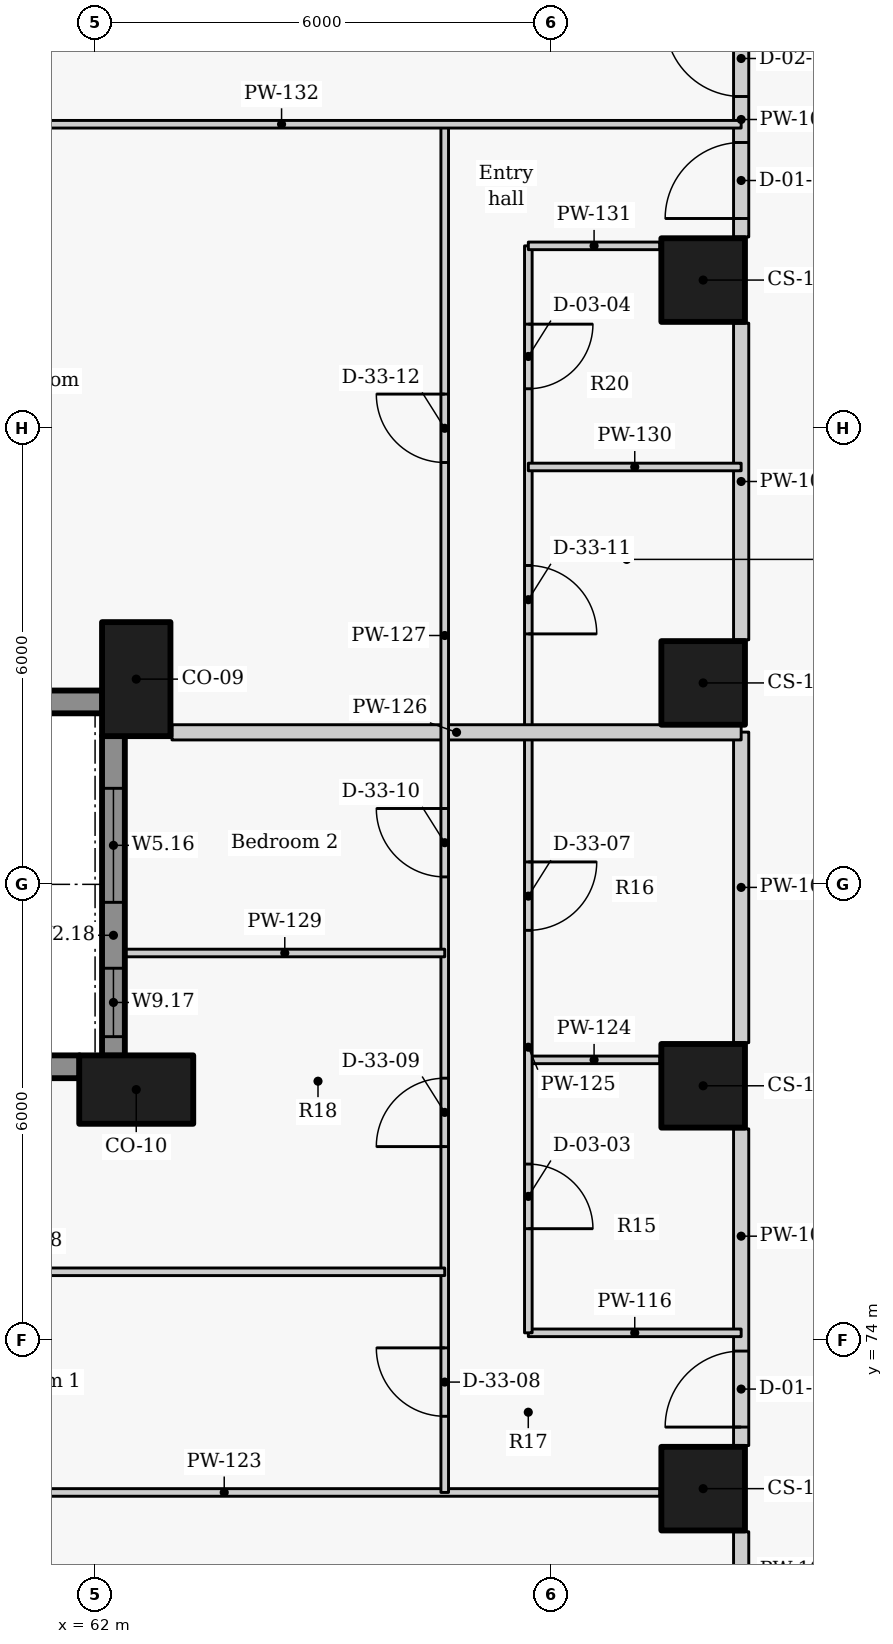
"""IFC4 building model, lengths in metres.
Left out: names, types, materials, properties, quantities, classifications, styles, units other than length and angle.
Written with IfcOpenShell. Run it as: python <this file> out.ifc"""

import sys

from ifc_helpers import new_model, si_unit, direction, frame, frame_2d, origin, origin_2d, place, context, subcontext, project, spatial, rectangle, extrude, element, fill, save


model = new_model("IFC4")
c1 = context("Model", 3, precision=1e-05, world=origin(), true_north=direction((0.0, 1.0)))
c2 = subcontext(c1, "Body", "Model", "MODEL_VIEW")
j1 = project(units=[si_unit("LENGTHUNIT", "METRE"), si_unit("PLANEANGLEUNIT", "RADIAN")], contexts=[c1])
p1 = place(None, origin())
s1 = spatial("IfcSite", under=j1, at=p1, CompositionType="ELEMENT")
p2 = place(p1, origin())
s2 = spatial("IfcBuilding", under=s1, at=p2, CompositionType="ELEMENT")
p3 = place(p2, frame((0.0, 0.0, 51.3)))
s3 = spatial("IfcBuildingStorey", under=s2, at=p3, CompositionType="ELEMENT", Elevation=51.3)
for number, where, z_axis, x_axis in (
    (1, (62.542, 82.7, 0.0), (0.0, 0.0, 1.0), (0.0, -1.0, 0.0)),
    (2, (62.542, 77.3, 0.0), (0.0, 0.0, 1.0), (-1.0, 0.0, 0.0)),
):
    element("IfcColumn", number, at=place(p3, frame(where, z_axis=z_axis, x_axis=x_axis)), inside=s3, PredefinedType="COLUMN", context=c2, shape_type="SweptSolid", body=[
        extrude(rectangle(XDim=1.5, YDim=0.9, at=origin_2d()), origin(), (0.0, 0.0, 1.0), 3.3),
    ])
for number, where, z_axis, x_axis in (
    (3, (70.0, 87.95, 0.0), (0.0, 0.0, 1.0), (0.0, -1.0, 0.0)),
    (4, (70.0, 82.65, 0.0), (0.0, 0.0, 1.0), (0.0, -1.0, 0.0)),
    (5, (70.0, 77.35, 0.0), (0.0, 0.0, 1.0), (0.0, -1.0, 0.0)),
    (6, (70.0, 72.05, 0.0), (0.0, 0.0, 1.0), (0.0, -1.0, 0.0)),
):
    element("IfcColumn", number, at=place(p3, frame(where, z_axis=z_axis, x_axis=x_axis)), inside=s3, PredefinedType="COLUMN", context=c2, shape_type="SweptSolid", body=[
        extrude(rectangle(XDim=1.1, YDim=1.1, at=origin_2d()), origin(), (0.0, 0.0, 1.0), 3.3),
    ])
p4 = place(p3, frame((57.923, 82.4, 0.0), z_axis=(0.0, 0.0, 1.0), x_axis=(1.0, 0.0, 0.0)))
e7 = element("IfcWall", 7, at=p4, inside=s3, PredefinedType="SOLIDWALL", context=c2, shape_type="SweptSolid", body=[
    extrude(rectangle(XDim=4.173, YDim=0.3, at=frame_2d((2.086, 0.0))), origin(), (0.0, 0.0, 1.0), 2.425),
])
p5 = place(p4, frame((1.036, 0.0, 0.9)))
e8 = element("IfcOpeningElement", 8, at=p5, cuts=e7, PredefinedType="OPENING", context=c2, shape_type="SweptSolid", body=[
    extrude(rectangle(XDim=2.1, YDim=1.1, at=frame_2d((1.05, 0.55))), frame((0.0, 0.16, 0.0), z_axis=(0.0, -1.0, 0.0), x_axis=(1.0, 0.0, 0.0)), (0.0, 0.0, 1.0), 0.32),
])
p6 = place(p3, frame((62.242, 81.954, 0.0), z_axis=(0.0, 0.0, 1.0), x_axis=(0.0, -1.0, 0.0)))
e9 = element("IfcWall", 9, at=p6, inside=s3, PredefinedType="SOLIDWALL", context=c2, shape_type="SweptSolid", body=[
    extrude(rectangle(XDim=4.208, YDim=0.3, at=frame_2d((2.104, 0.0))), origin(), (0.0, 0.0, 1.0), 2.425),
])
p7 = place(p6, frame((0.691, 0.0, 0.9)))
e10 = element("IfcOpeningElement", 10, at=p7, cuts=e9, PredefinedType="OPENING", context=c2, shape_type="SweptSolid", body=[
    extrude(rectangle(XDim=1.5, YDim=1.1, at=frame_2d((0.75, 0.55))), frame((0.0, 0.16, 0.0), z_axis=(0.0, -1.0, 0.0), x_axis=(1.0, 0.0, 0.0)), (0.0, 0.0, 1.0), 0.32),
])
p8 = place(p6, frame((3.058, 0.0, 0.9)))
e11 = element("IfcOpeningElement", 11, at=p8, cuts=e9, PredefinedType="OPENING", context=c2, shape_type="SweptSolid", body=[
    extrude(rectangle(XDim=0.9, YDim=1.1, at=frame_2d((0.45, 0.55))), frame((0.0, 0.16, 0.0), z_axis=(0.0, -1.0, 0.0), x_axis=(1.0, 0.0, 0.0)), (0.0, 0.0, 1.0), 0.32),
])
p9 = place(p3, frame((61.796, 77.6, 0.0), z_axis=(0.0, 0.0, 1.0), x_axis=(-1.0, 0.0, 0.0)))
e12 = element("IfcWall", 12, at=p9, inside=s3, PredefinedType="SOLIDWALL", context=c2, shape_type="SweptSolid", body=[
    extrude(rectangle(XDim=3.873, YDim=0.3, at=frame_2d((1.936, 0.0))), origin(), (0.0, 0.0, 1.0), 2.425),
])
p10 = place(p9, frame((0.886, 0.0, 0.9)))
e13 = element("IfcOpeningElement", 13, at=p10, cuts=e12, PredefinedType="OPENING", context=c2, shape_type="SweptSolid", body=[
    extrude(rectangle(XDim=2.1, YDim=1.1, at=frame_2d((1.05, 0.55))), frame((0.0, 0.16, 0.0), z_axis=(0.0, -1.0, 0.0), x_axis=(1.0, 0.0, 0.0)), (0.0, 0.0, 1.0), 0.32),
])
p11 = place(p3, frame((70.5, 68.267, 0.0), z_axis=(0.0, 0.0, 1.0), x_axis=(0.0, 1.0, 0.0)))
e14 = element("IfcWall", 14, at=p11, inside=s3, PredefinedType="PARTITIONING", context=c2, shape_type="SweptSolid", body=[
    extrude(rectangle(XDim=3.216, YDim=0.2, at=frame_2d((1.608, 0.0))), origin(), (0.0, 0.0, 1.0), 3.025),
])
p12 = place(p11, frame((1.108, 0.0, 0.0)))
e15 = element("IfcOpeningElement", 15, at=p12, cuts=e14, PredefinedType="OPENING", context=c2, shape_type="SweptSolid", body=[
    extrude(rectangle(XDim=1.0, YDim=2.1, at=frame_2d((0.5, 1.05))), frame((0.0, 0.11, 0.0), z_axis=(0.0, -1.0, 0.0), x_axis=(1.0, 0.0, 0.0)), (0.0, 0.0, 1.0), 0.22),
])
p13 = place(p3, frame((70.5, 72.617, 0.0), z_axis=(0.0, 0.0, 1.0), x_axis=(0.0, 1.0, 0.0)))
e16 = element("IfcWall", 16, at=p13, inside=s3, PredefinedType="PARTITIONING", context=c2, shape_type="SweptSolid", body=[
    extrude(rectangle(XDim=4.166, YDim=0.2, at=frame_2d((2.083, 0.0))), origin(), (0.0, 0.0, 1.0), 3.025),
])
p14 = place(p13, frame((0.243, 0.0, 0.0)))
e17 = element("IfcOpeningElement", 17, at=p14, cuts=e16, PredefinedType="OPENING", context=c2, shape_type="SweptSolid", body=[
    extrude(rectangle(XDim=1.0, YDim=2.1, at=frame_2d((0.5, 1.05))), frame((0.0, 0.11, 0.0), z_axis=(0.0, -1.0, 0.0), x_axis=(1.0, 0.0, 0.0)), (0.0, 0.0, 1.0), 0.22),
])
p15 = place(p3, frame((70.5, 77.917, 0.0), z_axis=(0.0, 0.0, 1.0), x_axis=(0.0, 1.0, 0.0)))
e18 = element("IfcWall", 18, at=p15, inside=s3, PredefinedType="PARTITIONING", context=c2, shape_type="SweptSolid", body=[
    extrude(rectangle(XDim=4.086, YDim=0.2, at=frame_2d((2.043, 0.0))), origin(), (0.0, 0.0, 1.0), 3.025),
])
p16 = place(p3, frame((70.5, 83.217, 0.0), z_axis=(0.0, 0.0, 1.0), x_axis=(0.0, 1.0, 0.0)))
e19 = element("IfcWall", 19, at=p16, inside=s3, PredefinedType="PARTITIONING", context=c2, shape_type="SweptSolid", body=[
    extrude(rectangle(XDim=4.166, YDim=0.2, at=frame_2d((2.083, 0.0))), origin(), (0.0, 0.0, 1.0), 3.025),
])
p17 = place(p3, frame((70.5, 88.517, 0.0), z_axis=(0.0, 0.0, 1.0), x_axis=(0.0, 1.0, 0.0)))
e20 = element("IfcWall", 20, at=p17, inside=s3, PredefinedType="PARTITIONING", context=c2, shape_type="SweptSolid", body=[
    extrude(rectangle(XDim=3.216, YDim=0.2, at=frame_2d((1.608, 0.0))), origin(), (0.0, 0.0, 1.0), 3.025),
])
p18 = place(p17, frame((0.243, 0.0, 0.0)))
e21 = element("IfcOpeningElement", 21, at=p18, cuts=e20, PredefinedType="OPENING", context=c2, shape_type="SweptSolid", body=[
    extrude(rectangle(XDim=1.0, YDim=2.1, at=frame_2d((0.5, 1.05))), frame((0.0, 0.11, 0.0), z_axis=(0.0, -1.0, 0.0), x_axis=(1.0, 0.0, 0.0)), (0.0, 0.0, 1.0), 0.22),
])
p19 = place(p17, frame((1.848, 0.0, 0.0)))
e22 = element("IfcOpeningElement", 22, at=p19, cuts=e20, PredefinedType="OPENING", context=c2, shape_type="SweptSolid", body=[
    extrude(rectangle(XDim=1.0, YDim=2.1, at=frame_2d((0.5, 1.05))), frame((0.0, 0.11, 0.0), z_axis=(0.0, -1.0, 0.0), x_axis=(1.0, 0.0, 0.0)), (0.0, 0.0, 1.0), 0.22),
])
p20 = place(p3, frame((67.7, 74.1, 0.0), z_axis=(0.0, 0.0, 1.0), x_axis=(1.0, 0.0, 0.0)))
e23 = element("IfcWall", 23, at=p20, inside=s3, PredefinedType="PARTITIONING", context=c2, shape_type="SweptSolid", body=[
    extrude(rectangle(XDim=2.8, YDim=0.1, at=frame_2d((1.4, 0.0))), origin(), (0.0, 0.0, 1.0), 2.505),
])
p21 = place(p3, frame((57.968, 72.0, 0.0), z_axis=(0.0, 0.0, 1.0), x_axis=(1.0, 0.0, 0.0)))
e24 = element("IfcWall", 24, at=p21, inside=s3, PredefinedType="PARTITIONING", context=c2, shape_type="SweptSolid", body=[
    extrude(rectangle(XDim=11.462, YDim=0.1, at=frame_2d((5.731, 0.0))), origin(), (0.0, 0.0, 1.0), 3.025),
])
p22 = place(p3, frame((67.7, 77.691, 0.0), z_axis=(0.0, 0.0, 1.0), x_axis=(1.0, 0.0, 0.0)))
e25 = element("IfcWall", 25, at=p22, inside=s3, PredefinedType="PARTITIONING", context=c2, shape_type="SweptSolid", body=[
    extrude(rectangle(XDim=1.73, YDim=0.1, at=frame_2d((0.865, 0.0))), origin(), (0.0, 0.0, 1.0), 3.025),
])
p23 = place(p3, frame((67.7, 88.4, 0.0), z_axis=(0.0, 0.0, 1.0), x_axis=(0.0, -1.0, 0.0)))
e26 = element("IfcWall", 26, at=p23, inside=s3, PredefinedType="PARTITIONING", context=c2, shape_type="SweptSolid", body=[
    extrude(rectangle(XDim=14.3, YDim=0.1, at=frame_2d((7.15, 0.0))), origin(), (0.0, 0.0, 1.0), 3.025),
])
p24 = place(p23, frame((12.08, 0.0, 0.0)))
e27 = element("IfcOpeningElement", 27, at=p24, cuts=e26, PredefinedType="OPENING", context=c2, shape_type="SweptSolid", body=[
    extrude(rectangle(XDim=0.85, YDim=2.1, at=frame_2d((0.425, 1.05))), frame((0.0, 0.06, 0.0), z_axis=(0.0, -1.0, 0.0), x_axis=(1.0, 0.0, 0.0)), (0.0, 0.0, 1.0), 0.12),
])
p25 = place(p23, frame((8.105, 0.0, 0.0)))
e28 = element("IfcOpeningElement", 28, at=p25, cuts=e26, PredefinedType="OPENING", context=c2, shape_type="SweptSolid", body=[
    extrude(rectangle(XDim=0.9, YDim=2.1, at=frame_2d((0.45, 1.05))), frame((0.0, 0.06, 0.0), z_axis=(0.0, -1.0, 0.0), x_axis=(1.0, 0.0, 0.0)), (0.0, 0.0, 1.0), 0.12),
])
p26 = place(p23, frame((4.205, 0.0, 0.0)))
e29 = element("IfcOpeningElement", 29, at=p26, cuts=e26, PredefinedType="OPENING", context=c2, shape_type="SweptSolid", body=[
    extrude(rectangle(XDim=0.9, YDim=2.1, at=frame_2d((0.45, 1.05))), frame((0.0, 0.06, 0.0), z_axis=(0.0, -1.0, 0.0), x_axis=(1.0, 0.0, 0.0)), (0.0, 0.0, 1.0), 0.12),
])
p27 = place(p23, frame((1.03, 0.0, 0.0)))
e30 = element("IfcOpeningElement", 30, at=p27, cuts=e26, PredefinedType="OPENING", context=c2, shape_type="SweptSolid", body=[
    extrude(rectangle(XDim=0.85, YDim=2.1, at=frame_2d((0.425, 1.05))), frame((0.0, 0.06, 0.0), z_axis=(0.0, -1.0, 0.0), x_axis=(1.0, 0.0, 0.0)), (0.0, 0.0, 1.0), 0.12),
])
p28 = place(p3, frame((63.012, 82.0, 0.0), z_axis=(0.0, 0.0, 1.0), x_axis=(1.0, 0.0, 0.0)))
e31 = element("IfcWall", 31, at=p28, inside=s3, PredefinedType="PARTITIONING", context=c2, shape_type="SweptSolid", body=[
    extrude(rectangle(XDim=7.488, YDim=0.2, at=frame_2d((3.744, 0.0))), origin(), (0.0, 0.0, 1.0), 2.505),
])
p29 = place(p3, frame((66.6, 72.0, 0.0), z_axis=(0.0, 0.0, 1.0), x_axis=(0.0, 1.0, 0.0)))
e32 = element("IfcWall", 32, at=p29, inside=s3, PredefinedType="PARTITIONING", context=c2, shape_type="SweptSolid", body=[
    extrude(rectangle(XDim=18.0, YDim=0.1, at=frame_2d((9.0, 0.0))), origin(), (0.0, 0.0, 1.0), 3.025),
])
p30 = place(p29, frame((1.002, 0.0, 0.0)))
e33 = element("IfcOpeningElement", 33, at=p30, cuts=e32, PredefinedType="OPENING", context=c2, shape_type="SweptSolid", body=[
    extrude(rectangle(XDim=0.9, YDim=2.1, at=frame_2d((0.45, 1.05))), frame((0.0, 0.06, 0.0), z_axis=(0.0, -1.0, 0.0), x_axis=(1.0, 0.0, 0.0)), (0.0, 0.0, 1.0), 0.12),
])
p31 = place(p29, frame((4.55, 0.0, 0.0)))
e34 = element("IfcOpeningElement", 34, at=p31, cuts=e32, PredefinedType="OPENING", context=c2, shape_type="SweptSolid", body=[
    extrude(rectangle(XDim=0.9, YDim=2.1, at=frame_2d((0.45, 1.05))), frame((0.0, 0.06, 0.0), z_axis=(0.0, -1.0, 0.0), x_axis=(1.0, 0.0, 0.0)), (0.0, 0.0, 1.0), 0.12),
])
p32 = place(p29, frame((8.098, 0.0, 0.0)))
e35 = element("IfcOpeningElement", 35, at=p32, cuts=e32, PredefinedType="OPENING", context=c2, shape_type="SweptSolid", body=[
    extrude(rectangle(XDim=0.9, YDim=2.1, at=frame_2d((0.45, 1.05))), frame((0.0, 0.06, 0.0), z_axis=(0.0, -1.0, 0.0), x_axis=(1.0, 0.0, 0.0)), (0.0, 0.0, 1.0), 0.12),
])
p33 = place(p29, frame((13.55, 0.0, 0.0)))
e36 = element("IfcOpeningElement", 36, at=p33, cuts=e32, PredefinedType="OPENING", context=c2, shape_type="SweptSolid", body=[
    extrude(rectangle(XDim=0.9, YDim=2.1, at=frame_2d((0.45, 1.05))), frame((0.0, 0.06, 0.0), z_axis=(0.0, -1.0, 0.0), x_axis=(1.0, 0.0, 0.0)), (0.0, 0.0, 1.0), 0.12),
])
p34 = place(p3, frame((55.576, 74.903, 0.0), z_axis=(0.0, 0.0, 1.0), x_axis=(1.0, 0.0, 0.0)))
e37 = element("IfcWall", 37, at=p34, inside=s3, PredefinedType="PARTITIONING", context=c2, shape_type="SweptSolid", body=[
    extrude(rectangle(XDim=11.024, YDim=0.1, at=frame_2d((5.512, 0.0))), origin(), (0.0, 0.0, 1.0), 2.405),
])
p35 = place(p3, frame((62.392, 79.097, 0.0), z_axis=(0.0, 0.0, 1.0), x_axis=(1.0, 0.0, 0.0)))
e38 = element("IfcWall", 38, at=p35, inside=s3, PredefinedType="PARTITIONING", context=c2, shape_type="SweptSolid", body=[
    extrude(rectangle(XDim=4.208, YDim=0.1, at=frame_2d((2.104, 0.0))), origin(), (0.0, 0.0, 1.0), 2.405),
])
p36 = place(p3, frame((67.7, 85.491, 0.0), z_axis=(0.0, 0.0, 1.0), x_axis=(1.0, 0.0, 0.0)))
e39 = element("IfcWall", 39, at=p36, inside=s3, PredefinedType="PARTITIONING", context=c2, shape_type="SweptSolid", body=[
    extrude(rectangle(XDim=2.8, YDim=0.1, at=frame_2d((1.4, 0.0))), origin(), (0.0, 0.0, 1.0), 2.505),
])
p37 = place(p3, frame((67.7, 88.4, 0.0), z_axis=(0.0, 0.0, 1.0), x_axis=(1.0, 0.0, 0.0)))
e40 = element("IfcWall", 40, at=p37, inside=s3, PredefinedType="PARTITIONING", context=c2, shape_type="SweptSolid", body=[
    extrude(rectangle(XDim=1.73, YDim=0.1, at=frame_2d((0.865, 0.0))), origin(), (0.0, 0.0, 1.0), 3.025),
])
p38 = place(p3, frame((58.407, 90.0, 0.0), z_axis=(0.0, 0.0, 1.0), x_axis=(1.0, 0.0, 0.0)))
e41 = element("IfcWall", 41, at=p38, inside=s3, PredefinedType="PARTITIONING", context=c2, shape_type="SweptSolid", body=[
    extrude(rectangle(XDim=12.093, YDim=0.1, at=frame_2d((6.046, 0.0))), origin(), (0.0, 0.0, 1.0), 2.405),
])
p39 = place(p7, origin())
e42 = element("IfcWindow", 42, at=p39, inside=s3, PartitioningType="SINGLE_PANEL", PredefinedType="WINDOW", context=c2, shape_type="SweptSolid", body=[
    extrude(rectangle(XDim=1.5, YDim=1.1, at=frame_2d((0.75, 0.55))), frame((0.0, 0.03, 0.0), z_axis=(0.0, -1.0, 0.0), x_axis=(1.0, 0.0, 0.0)), (0.0, 0.0, 1.0), 0.06),
])
fill(e10, e42)
p40 = place(p8, origin())
e43 = element("IfcWindow", 43, at=p40, inside=s3, PartitioningType="SINGLE_PANEL", PredefinedType="WINDOW", context=c2, shape_type="SweptSolid", body=[
    extrude(rectangle(XDim=0.9, YDim=1.1, at=frame_2d((0.45, 0.55))), frame((0.0, 0.03, 0.0), z_axis=(0.0, -1.0, 0.0), x_axis=(1.0, 0.0, 0.0)), (0.0, 0.0, 1.0), 0.06),
])
fill(e11, e43)
p41 = place(p14, origin())
e44 = element("IfcDoor", 44, at=p41, inside=s3, OperationType="SINGLE_SWING_LEFT", PredefinedType="DOOR", context=c2, shape_type="SweptSolid", body=[
    extrude(rectangle(XDim=1.0, YDim=2.1, at=frame_2d((0.5, 1.05))), frame((0.0, 0.025, 0.0), z_axis=(0.0, -1.0, 0.0), x_axis=(1.0, 0.0, 0.0)), (0.0, 0.0, 1.0), 0.05),
])
fill(e17, e44)
p42 = place(p24, origin())
e45 = element("IfcDoor", 45, at=p42, inside=s3, OperationType="SINGLE_SWING_RIGHT", PredefinedType="DOOR", context=c2, shape_type="SweptSolid", body=[
    extrude(rectangle(XDim=0.85, YDim=2.1, at=frame_2d((0.425, 1.05))), frame((0.0, 0.025, 0.0), z_axis=(0.0, -1.0, 0.0), x_axis=(1.0, 0.0, 0.0)), (0.0, 0.0, 1.0), 0.05),
])
fill(e27, e45)
p43 = place(p25, origin())
e46 = element("IfcDoor", 46, at=p43, inside=s3, OperationType="SINGLE_SWING_LEFT", PredefinedType="DOOR", context=c2, shape_type="SweptSolid", body=[
    extrude(rectangle(XDim=0.9, YDim=2.1, at=frame_2d((0.45, 1.05))), frame((0.0, 0.025, 0.0), z_axis=(0.0, -1.0, 0.0), x_axis=(1.0, 0.0, 0.0)), (0.0, 0.0, 1.0), 0.05),
])
fill(e28, e46)
p44 = place(p30, origin())
e47 = element("IfcDoor", 47, at=p44, inside=s3, OperationType="SINGLE_SWING_RIGHT", PredefinedType="DOOR", context=c2, shape_type="SweptSolid", body=[
    extrude(rectangle(XDim=0.9, YDim=2.1, at=frame_2d((0.45, 1.05))), frame((0.0, 0.025, 0.0), z_axis=(0.0, -1.0, 0.0), x_axis=(1.0, 0.0, 0.0)), (0.0, 0.0, 1.0), 0.05),
])
fill(e33, e47)
p45 = place(p31, origin())
e48 = element("IfcDoor", 48, at=p45, inside=s3, OperationType="SINGLE_SWING_LEFT", PredefinedType="DOOR", context=c2, shape_type="SweptSolid", body=[
    extrude(rectangle(XDim=0.9, YDim=2.1, at=frame_2d((0.45, 1.05))), frame((0.0, 0.025, 0.0), z_axis=(0.0, -1.0, 0.0), x_axis=(1.0, 0.0, 0.0)), (0.0, 0.0, 1.0), 0.05),
])
fill(e34, e48)
p46 = place(p32, origin())
e49 = element("IfcDoor", 49, at=p46, inside=s3, OperationType="SINGLE_SWING_RIGHT", PredefinedType="DOOR", context=c2, shape_type="SweptSolid", body=[
    extrude(rectangle(XDim=0.9, YDim=2.1, at=frame_2d((0.45, 1.05))), frame((0.0, 0.025, 0.0), z_axis=(0.0, -1.0, 0.0), x_axis=(1.0, 0.0, 0.0)), (0.0, 0.0, 1.0), 0.05),
])
fill(e35, e49)
p47 = place(p18, origin())
e50 = element("IfcDoor", 50, at=p47, inside=s3, OperationType="SINGLE_SWING_LEFT", PredefinedType="DOOR", context=c2, shape_type="SweptSolid", body=[
    extrude(rectangle(XDim=1.0, YDim=2.1, at=frame_2d((0.5, 1.05))), frame((0.0, 0.025, 0.0), z_axis=(0.0, -1.0, 0.0), x_axis=(1.0, 0.0, 0.0)), (0.0, 0.0, 1.0), 0.05),
])
fill(e21, e50)
p48 = place(p26, origin())
e51 = element("IfcDoor", 51, at=p48, inside=s3, OperationType="SINGLE_SWING_RIGHT", PredefinedType="DOOR", context=c2, shape_type="SweptSolid", body=[
    extrude(rectangle(XDim=0.9, YDim=2.1, at=frame_2d((0.45, 1.05))), frame((0.0, 0.025, 0.0), z_axis=(0.0, -1.0, 0.0), x_axis=(1.0, 0.0, 0.0)), (0.0, 0.0, 1.0), 0.05),
])
fill(e29, e51)
p49 = place(p27, origin())
e52 = element("IfcDoor", 52, at=p49, inside=s3, OperationType="SINGLE_SWING_LEFT", PredefinedType="DOOR", context=c2, shape_type="SweptSolid", body=[
    extrude(rectangle(XDim=0.85, YDim=2.1, at=frame_2d((0.425, 1.05))), frame((0.0, 0.025, 0.0), z_axis=(0.0, -1.0, 0.0), x_axis=(1.0, 0.0, 0.0)), (0.0, 0.0, 1.0), 0.05),
])
fill(e30, e52)
p50 = place(p33, origin())
e53 = element("IfcDoor", 53, at=p50, inside=s3, OperationType="SINGLE_SWING_RIGHT", PredefinedType="DOOR", context=c2, shape_type="SweptSolid", body=[
    extrude(rectangle(XDim=0.9, YDim=2.1, at=frame_2d((0.45, 1.05))), frame((0.0, 0.025, 0.0), z_axis=(0.0, -1.0, 0.0), x_axis=(1.0, 0.0, 0.0)), (0.0, 0.0, 1.0), 0.05),
])
fill(e36, e53)
p51 = place(p19, origin())
e54 = element("IfcDoor", 54, at=p51, inside=s3, OperationType="SINGLE_SWING_RIGHT", PredefinedType="DOOR", context=c2, shape_type="SweptSolid", body=[
    extrude(rectangle(XDim=1.0, YDim=2.1, at=frame_2d((0.5, 1.05))), frame((0.0, 0.025, 0.0), z_axis=(0.0, -1.0, 0.0), x_axis=(1.0, 0.0, 0.0)), (0.0, 0.0, 1.0), 0.05),
])
fill(e22, e54)
save(model, sys.argv[1])
